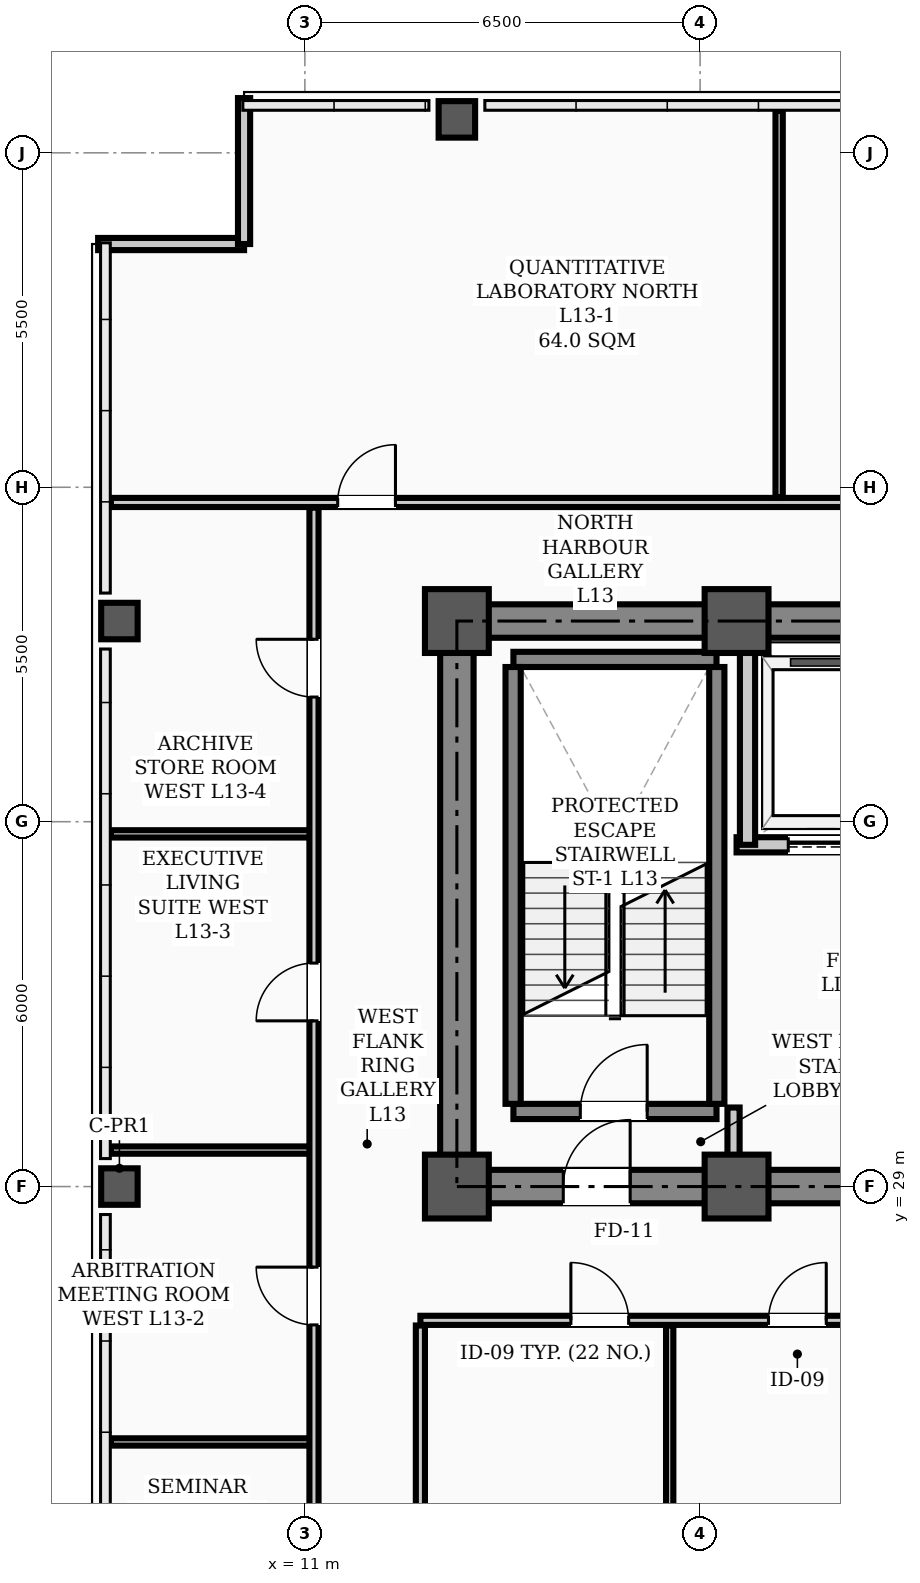
"""IFC4 building model, lengths in metres.
Left out: names, types, materials, properties, quantities, classifications, styles, units other than length and angle.
Written with IfcOpenShell. Run it as: python <this file> out.ifc"""

import sys

from ifc_helpers import new_model, si_unit, direction, frame, frame_2d, origin, origin_2d, place, context, subcontext, project, spatial, rectangle, hollow_rectangle, extrude, element, fill, save


model = new_model("IFC4")
c1 = context("Model", 3, precision=1e-05, world=origin(), true_north=direction((0.0, 1.0)))
c2 = subcontext(c1, "Body", "Model", "MODEL_VIEW")
j1 = project(units=[si_unit("LENGTHUNIT", "METRE"), si_unit("PLANEANGLEUNIT", "RADIAN")], contexts=[c1])
p1 = place(None, origin())
s1 = spatial("IfcSite", under=j1, at=p1, CompositionType="ELEMENT")
p2 = place(p1, origin())
s2 = spatial("IfcBuilding", under=s1, at=p2, CompositionType="ELEMENT")
p3 = place(p2, frame((0.0, 0.0, 53.8)))
s3 = spatial("IfcBuildingStorey", under=s2, at=p3, CompositionType="ELEMENT", Elevation=53.8)
for number, where, z_axis, x_axis in (
    (1, (13.5, 29.0, 0.0), (0.0, 0.0, 1.0), (1.0, 0.0, 0.0)),
    (2, (13.5, 38.3, 0.0), (0.0, 0.0, 1.0), (1.0, 0.0, 0.0)),
    (3, (18.1, 29.0, 0.0), (0.0, 0.0, 1.0), (1.0, 0.0, 0.0)),
    (4, (18.1, 38.3, 0.0), (0.0, 0.0, 1.0), (1.0, 0.0, 0.0)),
):
    element("IfcColumn", number, at=place(p3, frame(where, z_axis=z_axis, x_axis=x_axis)), inside=s3, PredefinedType="COLUMN", context=c2, shape_type="SweptSolid", body=[
        extrude(hollow_rectangle(XDim=1.05, YDim=1.05, WallThickness=0.038, InnerFilletRadius=0.019, OuterFilletRadius=0.057, at=origin_2d()), origin(), (0.0, 0.0, 1.0), 3.9),
    ])
for number, where, z_axis, x_axis in (
    (5, (7.95, 29.0, 0.0), (0.0, 0.0, 1.0), (1.0, 0.0, 0.0)),
    (6, (7.95, 38.3, 0.0), (0.0, 0.0, 1.0), (1.0, 0.0, 0.0)),
    (7, (13.5, 46.55, 0.0), (0.0, 0.0, 1.0), (1.0, 0.0, 0.0)),
):
    element("IfcColumn", number, at=place(p3, frame(where, z_axis=z_axis, x_axis=x_axis)), inside=s3, PredefinedType="COLUMN", context=c2, shape_type="SweptSolid", body=[
        extrude(hollow_rectangle(XDim=0.6, YDim=0.6, WallThickness=0.026, InnerFilletRadius=0.013, OuterFilletRadius=0.039, at=origin_2d()), origin(), (0.0, 0.0, 1.0), 3.9),
    ])
for number, where, z_axis, x_axis in (
    (8, (7.6, 44.5, 0.0), (0.0, 0.0, 1.0), (1.0, 0.0, 0.0)),
    (9, (10.0, 44.5, 0.0), (0.0, 0.0, 1.0), (0.0, 1.0, 0.0)),
):
    element("IfcWall", number, at=place(p3, frame(where, z_axis=z_axis, x_axis=x_axis)), inside=s3, PredefinedType="PARAPET", context=c2, shape_type="SweptSolid", body=[
        extrude(rectangle(XDim=2.4, YDim=0.2, at=frame_2d((1.2, 0.0))), origin(), (0.0, 0.0, 1.0), 1.2),
    ])
p4 = place(p3, frame((13.5, 29.0, 0.0), z_axis=(0.0, 0.0, 1.0), x_axis=(1.0, 0.0, 0.0)))
e10 = element("IfcWall", 10, at=p4, inside=s3, PredefinedType="SHEAR", context=c2, shape_type="SweptSolid", body=[
    extrude(rectangle(XDim=30.5, YDim=0.55, at=frame_2d((15.25, 0.0))), origin(), (0.0, 0.0, 1.0), 3.72),
])
p5 = place(p4, frame((1.75, 0.0, 0.0)))
e11 = element("IfcOpeningElement", 11, at=p5, cuts=e10, PredefinedType="OPENING", context=c2, shape_type="SweptSolid", body=[
    extrude(rectangle(XDim=1.1, YDim=2.08, at=frame_2d((0.55, 1.04))), frame((0.0, 0.285, 0.0), z_axis=(0.0, -1.0, 0.0), x_axis=(1.0, 0.0, 0.0)), (0.0, 0.0, 1.0), 0.57),
])
p6 = place(p4, frame((26.7, 0.0, 0.0)))
e12 = element("IfcOpeningElement", 12, at=p6, cuts=e10, PredefinedType="OPENING", context=c2, shape_type="SweptSolid", body=[
    extrude(rectangle(XDim=1.1, YDim=2.08, at=frame_2d((0.55, 1.04))), frame((0.0, 0.285, 0.0), z_axis=(0.0, -1.0, 0.0), x_axis=(1.0, 0.0, 0.0)), (0.0, 0.0, 1.0), 0.57),
])
p7 = place(p4, frame((6.8, 0.0, 0.0)))
e13 = element("IfcOpeningElement", 13, at=p7, cuts=e10, PredefinedType="OPENING", context=c2, shape_type="SweptSolid", body=[
    extrude(rectangle(XDim=1.1, YDim=2.08, at=frame_2d((0.55, 1.04))), frame((0.0, 0.285, 0.0), z_axis=(0.0, -1.0, 0.0), x_axis=(1.0, 0.0, 0.0)), (0.0, 0.0, 1.0), 0.57),
])
p8 = place(p4, frame((13.2, 0.0, 0.0)))
e14 = element("IfcOpeningElement", 14, at=p8, cuts=e10, PredefinedType="OPENING", context=c2, shape_type="SweptSolid", body=[
    extrude(rectangle(XDim=1.6, YDim=2.08, at=frame_2d((0.8, 1.04))), frame((0.0, 0.285, 0.0), z_axis=(0.0, -1.0, 0.0), x_axis=(1.0, 0.0, 0.0)), (0.0, 0.0, 1.0), 0.57),
])
p9 = place(p4, frame((19.5, 0.0, 0.0)))
e15 = element("IfcOpeningElement", 15, at=p9, cuts=e10, PredefinedType="OPENING", context=c2, shape_type="SweptSolid", body=[
    extrude(rectangle(XDim=0.9, YDim=2.08, at=frame_2d((0.45, 1.04))), frame((0.0, 0.285, 0.0), z_axis=(0.0, -1.0, 0.0), x_axis=(1.0, 0.0, 0.0)), (0.0, 0.0, 1.0), 0.57),
])
p10 = place(p4, frame((21.55, 0.0, 0.0)))
e16 = element("IfcOpeningElement", 16, at=p10, cuts=e10, PredefinedType="OPENING", context=c2, shape_type="SweptSolid", body=[
    extrude(rectangle(XDim=0.9, YDim=2.08, at=frame_2d((0.45, 1.04))), frame((0.0, 0.285, 0.0), z_axis=(0.0, -1.0, 0.0), x_axis=(1.0, 0.0, 0.0)), (0.0, 0.0, 1.0), 0.57),
])
p11 = place(p3, frame((13.5, 38.3, 0.0), z_axis=(0.0, 0.0, 1.0), x_axis=(1.0, 0.0, 0.0)))
e17 = element("IfcWall", 17, at=p11, inside=s3, PredefinedType="SHEAR", context=c2, shape_type="SweptSolid", body=[
    extrude(rectangle(XDim=30.5, YDim=0.55, at=frame_2d((15.25, 0.0))), origin(), (0.0, 0.0, 1.0), 3.72),
])
p12 = place(p3, frame((13.5, 29.35, 0.0), z_axis=(0.0, 0.0, 1.0), x_axis=(0.0, 1.0, 0.0)))
e18 = element("IfcWall", 18, at=p12, inside=s3, PredefinedType="SHEAR", context=c2, shape_type="SweptSolid", body=[
    extrude(rectangle(XDim=8.6, YDim=0.55, at=frame_2d((4.3, 0.0))), origin(), (0.0, 0.0, 1.0), 3.72),
])
p13 = place(p3, frame((14.43, 30.235, 0.0), z_axis=(0.0, 0.0, 1.0), x_axis=(1.0, 0.0, 0.0)))
e19 = element("IfcWall", 19, at=p13, inside=s3, PredefinedType="STANDARD", context=c2, shape_type="SweptSolid", body=[
    extrude(rectangle(XDim=3.34, YDim=0.25, at=frame_2d((1.67, 0.0))), origin(), (0.0, 0.0, 1.0), 3.72),
])
p14 = place(p13, frame((1.1, 0.0, 0.0)))
e20 = element("IfcOpeningElement", 20, at=p14, cuts=e19, PredefinedType="OPENING", context=c2, shape_type="SweptSolid", body=[
    extrude(rectangle(XDim=1.1, YDim=2.08, at=frame_2d((0.55, 1.04))), frame((0.0, 0.135, 0.0), z_axis=(0.0, -1.0, 0.0), x_axis=(1.0, 0.0, 0.0)), (0.0, 0.0, 1.0), 0.27),
])
p15 = place(p3, frame((14.43, 37.669, 0.0), z_axis=(0.0, 0.0, 1.0), x_axis=(1.0, 0.0, 0.0)))
e21 = element("IfcWall", 21, at=p15, inside=s3, PredefinedType="STANDARD", context=c2, shape_type="SweptSolid", body=[
    extrude(rectangle(XDim=3.34, YDim=0.25, at=frame_2d((1.67, 0.0))), origin(), (0.0, 0.0, 1.0), 3.72),
])
for number, where, z_axis, x_axis in (
    (22, (14.425, 30.36, 0.0), (0.0, 0.0, 1.0), (0.0, 1.0, 0.0)),
    (23, (17.775, 30.36, 0.0), (0.0, 0.0, 1.0), (0.0, 1.0, 0.0)),
):
    element("IfcWall", number, at=place(p3, frame(where, z_axis=z_axis, x_axis=x_axis)), inside=s3, PredefinedType="STANDARD", context=c2, shape_type="SweptSolid", body=[
        extrude(rectangle(XDim=7.184, YDim=0.25, at=frame_2d((3.592, 0.0))), origin(), (0.0, 0.0, 1.0), 3.72),
    ])
p16 = place(p3, frame((18.1, 34.62, 0.0), z_axis=(0.0, 0.0, 1.0), x_axis=(1.0, 0.0, 0.0)))
e24 = element("IfcWall", 24, at=p16, inside=s3, PredefinedType="STANDARD", context=c2, shape_type="SweptSolid", body=[
    extrude(rectangle(XDim=5.35, YDim=0.25, at=frame_2d((2.675, 0.0))), origin(), (0.0, 0.0, 1.0), 3.72),
])
p17 = place(p16, frame((0.85, 0.0, 0.0)))
e25 = element("IfcOpeningElement", 25, at=p17, cuts=e24, PredefinedType="OPENING", context=c2, shape_type="SweptSolid", body=[
    extrude(rectangle(XDim=1.1, YDim=2.08, at=frame_2d((0.55, 1.04))), frame((0.0, 0.135, 0.0), z_axis=(0.0, -1.0, 0.0), x_axis=(1.0, 0.0, 0.0)), (0.0, 0.0, 1.0), 0.27),
])
p18 = place(p16, frame((3.45, 0.0, 0.0)))
e26 = element("IfcOpeningElement", 26, at=p18, cuts=e24, PredefinedType="OPENING", context=c2, shape_type="SweptSolid", body=[
    extrude(rectangle(XDim=1.1, YDim=2.08, at=frame_2d((0.55, 1.04))), frame((0.0, 0.135, 0.0), z_axis=(0.0, -1.0, 0.0), x_axis=(1.0, 0.0, 0.0)), (0.0, 0.0, 1.0), 0.27),
])
p19 = place(p3, frame((18.28, 34.62, 0.0), z_axis=(0.0, 0.0, 1.0), x_axis=(0.0, 1.0, 0.0)))
e27 = element("IfcWall", 27, at=p19, inside=s3, PredefinedType="STANDARD", context=c2, shape_type="SweptSolid", body=[
    extrude(rectangle(XDim=3.33, YDim=0.25, at=frame_2d((1.665, 0.0))), origin(), (0.0, 0.0, 1.0), 3.3),
])
p20 = place(p3, frame((12.9, 26.8, 0.0), z_axis=(0.0, 0.0, 1.0), x_axis=(1.0, 0.0, 0.0)))
e28 = element("IfcWall", 28, at=p20, inside=s3, PredefinedType="PARTITIONING", context=c2, shape_type="SweptSolid", body=[
    extrude(rectangle(XDim=31.7, YDim=0.15, at=frame_2d((15.85, 0.0))), origin(), (0.0, 0.0, 1.0), 3.1),
])
p21 = place(p20, frame((13.6, 0.0, 0.0)))
e29 = element("IfcOpeningElement", 29, at=p21, cuts=e28, PredefinedType="OPENING", context=c2, shape_type="SweptSolid", body=[
    extrude(rectangle(XDim=1.6, YDim=2.08, at=frame_2d((0.8, 1.04))), frame((0.0, 0.085, 0.0), z_axis=(0.0, -1.0, 0.0), x_axis=(1.0, 0.0, 0.0)), (0.0, 0.0, 1.0), 0.17),
])
p22 = place(p20, frame((2.475, 0.0, 0.0)))
e30 = element("IfcOpeningElement", 30, at=p22, cuts=e28, PredefinedType="OPENING", context=c2, shape_type="SweptSolid", body=[
    extrude(rectangle(XDim=0.95, YDim=2.08, at=frame_2d((0.475, 1.04))), frame((0.0, 0.085, 0.0), z_axis=(0.0, -1.0, 0.0), x_axis=(1.0, 0.0, 0.0)), (0.0, 0.0, 1.0), 0.17),
])
p23 = place(p20, frame((5.725, 0.0, 0.0)))
e31 = element("IfcOpeningElement", 31, at=p23, cuts=e28, PredefinedType="OPENING", context=c2, shape_type="SweptSolid", body=[
    extrude(rectangle(XDim=0.95, YDim=2.08, at=frame_2d((0.475, 1.04))), frame((0.0, 0.085, 0.0), z_axis=(0.0, -1.0, 0.0), x_axis=(1.0, 0.0, 0.0)), (0.0, 0.0, 1.0), 0.17),
])
p24 = place(p20, frame((8.875, 0.0, 0.0)))
e32 = element("IfcOpeningElement", 32, at=p24, cuts=e28, PredefinedType="OPENING", context=c2, shape_type="SweptSolid", body=[
    extrude(rectangle(XDim=0.95, YDim=2.08, at=frame_2d((0.475, 1.04))), frame((0.0, 0.085, 0.0), z_axis=(0.0, -1.0, 0.0), x_axis=(1.0, 0.0, 0.0)), (0.0, 0.0, 1.0), 0.17),
])
p25 = place(p20, frame((16.075, 0.0, 0.0)))
e33 = element("IfcOpeningElement", 33, at=p25, cuts=e28, PredefinedType="OPENING", context=c2, shape_type="SweptSolid", body=[
    extrude(rectangle(XDim=0.95, YDim=2.08, at=frame_2d((0.475, 1.04))), frame((0.0, 0.085, 0.0), z_axis=(0.0, -1.0, 0.0), x_axis=(1.0, 0.0, 0.0)), (0.0, 0.0, 1.0), 0.17),
])
p26 = place(p20, frame((22.525, 0.0, 0.0)))
e34 = element("IfcOpeningElement", 34, at=p26, cuts=e28, PredefinedType="OPENING", context=c2, shape_type="SweptSolid", body=[
    extrude(rectangle(XDim=0.95, YDim=2.08, at=frame_2d((0.475, 1.04))), frame((0.0, 0.085, 0.0), z_axis=(0.0, -1.0, 0.0), x_axis=(1.0, 0.0, 0.0)), (0.0, 0.0, 1.0), 0.17),
])
p27 = place(p20, frame((28.825, 0.0, 0.0)))
e35 = element("IfcOpeningElement", 35, at=p27, cuts=e28, PredefinedType="OPENING", context=c2, shape_type="SweptSolid", body=[
    extrude(rectangle(XDim=0.95, YDim=2.08, at=frame_2d((0.475, 1.04))), frame((0.0, 0.085, 0.0), z_axis=(0.0, -1.0, 0.0), x_axis=(1.0, 0.0, 0.0)), (0.0, 0.0, 1.0), 0.17),
])
p28 = place(p3, frame((7.81, 24.8, 0.0), z_axis=(0.0, 0.0, 1.0), x_axis=(1.0, 0.0, 0.0)))
e36 = element("IfcWall", 36, at=p28, inside=s3, PredefinedType="PARTITIONING", context=c2, shape_type="SweptSolid", body=[
    extrude(rectangle(XDim=3.34, YDim=0.12, at=frame_2d((1.67, 0.0))), origin(), (0.0, 0.0, 1.0), 3.212),
])
p29 = place(p3, frame((7.81, 29.6, 0.0), z_axis=(0.0, 0.0, 1.0), x_axis=(1.0, 0.0, 0.0)))
e37 = element("IfcWall", 37, at=p29, inside=s3, PredefinedType="PARTITIONING", context=c2, shape_type="SweptSolid", body=[
    extrude(rectangle(XDim=3.34, YDim=0.12, at=frame_2d((1.67, 0.0))), origin(), (0.0, 0.0, 1.0), 3.0),
])
p30 = place(p3, frame((7.81, 34.8, 0.0), z_axis=(0.0, 0.0, 1.0), x_axis=(1.0, 0.0, 0.0)))
e38 = element("IfcWall", 38, at=p30, inside=s3, PredefinedType="PARTITIONING", context=c2, shape_type="SweptSolid", body=[
    extrude(rectangle(XDim=3.34, YDim=0.12, at=frame_2d((1.67, 0.0))), origin(), (0.0, 0.0, 1.0), 3.212),
])
p31 = place(p3, frame((7.81, 40.25, 0.0), z_axis=(0.0, 0.0, 1.0), x_axis=(1.0, 0.0, 0.0)))
e39 = element("IfcWall", 39, at=p31, inside=s3, PredefinedType="PARTITIONING", context=c2, shape_type="SweptSolid", body=[
    extrude(rectangle(XDim=49.38, YDim=0.15, at=frame_2d((24.69, 0.0))), origin(), (0.0, 0.0, 1.0), 3.1),
])
p32 = place(p31, frame((3.73, 0.0, 0.0)))
e40 = element("IfcOpeningElement", 40, at=p32, cuts=e39, PredefinedType="OPENING", context=c2, shape_type="SweptSolid", body=[
    extrude(rectangle(XDim=0.95, YDim=2.08, at=frame_2d((0.475, 1.04))), frame((0.0, 0.085, 0.0), z_axis=(0.0, -1.0, 0.0), x_axis=(1.0, 0.0, 0.0)), (0.0, 0.0, 1.0), 0.17),
])
p33 = place(p31, frame((13.815, 0.0, 0.0)))
e41 = element("IfcOpeningElement", 41, at=p33, cuts=e39, PredefinedType="OPENING", context=c2, shape_type="SweptSolid", body=[
    extrude(rectangle(XDim=0.95, YDim=2.08, at=frame_2d((0.475, 1.04))), frame((0.0, 0.085, 0.0), z_axis=(0.0, -1.0, 0.0), x_axis=(1.0, 0.0, 0.0)), (0.0, 0.0, 1.0), 0.17),
])
p34 = place(p31, frame((19.965, 0.0, 0.0)))
e42 = element("IfcOpeningElement", 42, at=p34, cuts=e39, PredefinedType="OPENING", context=c2, shape_type="SweptSolid", body=[
    extrude(rectangle(XDim=0.95, YDim=2.08, at=frame_2d((0.475, 1.04))), frame((0.0, 0.085, 0.0), z_axis=(0.0, -1.0, 0.0), x_axis=(1.0, 0.0, 0.0)), (0.0, 0.0, 1.0), 0.17),
])
p35 = place(p31, frame((30.815, 0.0, 0.0)))
e43 = element("IfcOpeningElement", 43, at=p35, cuts=e39, PredefinedType="OPENING", context=c2, shape_type="SweptSolid", body=[
    extrude(rectangle(XDim=0.95, YDim=2.08, at=frame_2d((0.475, 1.04))), frame((0.0, 0.085, 0.0), z_axis=(0.0, -1.0, 0.0), x_axis=(1.0, 0.0, 0.0)), (0.0, 0.0, 1.0), 0.17),
])
p36 = place(p31, frame((37.2, 0.0, 0.0)))
e44 = element("IfcOpeningElement", 44, at=p36, cuts=e39, PredefinedType="OPENING", context=c2, shape_type="SweptSolid", body=[
    extrude(rectangle(XDim=0.95, YDim=2.08, at=frame_2d((0.475, 1.04))), frame((0.0, 0.085, 0.0), z_axis=(0.0, -1.0, 0.0), x_axis=(1.0, 0.0, 0.0)), (0.0, 0.0, 1.0), 0.17),
])
p37 = place(p3, frame((18.05, 29.285, 0.0), z_axis=(0.0, 0.0, 1.0), x_axis=(0.0, 1.0, 0.0)))
e45 = element("IfcWall", 45, at=p37, inside=s3, PredefinedType="STANDARD", context=c2, shape_type="SweptSolid", body=[
    extrude(rectangle(XDim=1.015, YDim=0.2, at=frame_2d((0.508, 0.0))), origin(), (0.0, 0.0, 1.0), 3.3),
])
p38 = place(p3, frame((11.15, 17.635, 0.0), z_axis=(0.0, 0.0, 1.0), x_axis=(0.0, 1.0, 0.0)))
e46 = element("IfcWall", 46, at=p38, inside=s3, PredefinedType="PARTITIONING", context=c2, shape_type="SweptSolid", body=[
    extrude(rectangle(XDim=22.53, YDim=0.15, at=frame_2d((11.265, 0.0))), origin(), (0.0, 0.0, 1.0), 3.0),
])
p39 = place(p38, frame((3.065, 0.0, 0.0)))
e47 = element("IfcOpeningElement", 47, at=p39, cuts=e46, PredefinedType="OPENING", context=c2, shape_type="SweptSolid", body=[
    extrude(rectangle(XDim=0.95, YDim=2.08, at=frame_2d((0.475, 1.04))), frame((0.0, 0.085, 0.0), z_axis=(0.0, -1.0, 0.0), x_axis=(1.0, 0.0, 0.0)), (0.0, 0.0, 1.0), 0.17),
])
p40 = place(p38, frame((9.09, 0.0, 0.0)))
e48 = element("IfcOpeningElement", 48, at=p40, cuts=e46, PredefinedType="OPENING", context=c2, shape_type="SweptSolid", body=[
    extrude(rectangle(XDim=0.95, YDim=2.08, at=frame_2d((0.475, 1.04))), frame((0.0, 0.085, 0.0), z_axis=(0.0, -1.0, 0.0), x_axis=(1.0, 0.0, 0.0)), (0.0, 0.0, 1.0), 0.17),
])
p41 = place(p38, frame((14.09, 0.0, 0.0)))
e49 = element("IfcOpeningElement", 49, at=p41, cuts=e46, PredefinedType="OPENING", context=c2, shape_type="SweptSolid", body=[
    extrude(rectangle(XDim=0.95, YDim=2.08, at=frame_2d((0.475, 1.04))), frame((0.0, 0.085, 0.0), z_axis=(0.0, -1.0, 0.0), x_axis=(1.0, 0.0, 0.0)), (0.0, 0.0, 1.0), 0.17),
])
p42 = place(p38, frame((19.415, 0.0, 0.0)))
e50 = element("IfcOpeningElement", 50, at=p42, cuts=e46, PredefinedType="OPENING", context=c2, shape_type="SweptSolid", body=[
    extrude(rectangle(XDim=0.95, YDim=2.08, at=frame_2d((0.475, 1.04))), frame((0.0, 0.085, 0.0), z_axis=(0.0, -1.0, 0.0), x_axis=(1.0, 0.0, 0.0)), (0.0, 0.0, 1.0), 0.17),
])
p43 = place(p3, frame((12.9, 19.335, 0.0), z_axis=(0.0, 0.0, 1.0), x_axis=(0.0, 1.0, 0.0)))
e51 = element("IfcWall", 51, at=p43, inside=s3, PredefinedType="PARTITIONING", context=c2, shape_type="SweptSolid", body=[
    extrude(rectangle(XDim=7.38, YDim=0.15, at=frame_2d((3.69, 0.0))), origin(), (0.0, 0.0, 1.0), 3.0),
])
p44 = place(p3, frame((17.0, 19.335, 0.0), z_axis=(0.0, 0.0, 1.0), x_axis=(0.0, 1.0, 0.0)))
e52 = element("IfcWall", 52, at=p44, inside=s3, PredefinedType="PARTITIONING", context=c2, shape_type="SweptSolid", body=[
    extrude(rectangle(XDim=7.38, YDim=0.12, at=frame_2d((3.69, 0.0))), origin(), (0.0, 0.0, 1.0), 3.0),
])
p45 = place(p3, frame((18.8, 40.335, 0.0), z_axis=(0.0, 0.0, 1.0), x_axis=(0.0, 1.0, 0.0)))
e53 = element("IfcWall", 53, at=p45, inside=s3, PredefinedType="PARTITIONING", context=c2, shape_type="SweptSolid", body=[
    extrude(rectangle(XDim=6.355, YDim=0.12, at=frame_2d((3.177, 0.0))), origin(), (0.0, 0.0, 1.0), 3.212),
])
p46 = place(p14, origin())
e54 = element("IfcDoor", 54, at=p46, inside=s3, OperationType="SINGLE_SWING_RIGHT", PredefinedType="DOOR", context=c2, shape_type="SweptSolid", body=[
    extrude(rectangle(XDim=1.1, YDim=2.08, at=frame_2d((0.55, 1.04))), frame((0.0, 0.025, 0.0), z_axis=(0.0, -1.0, 0.0), x_axis=(1.0, 0.0, 0.0)), (0.0, 0.0, 1.0), 0.05),
])
fill(e20, e54)
p47 = place(p5, origin())
e55 = element("IfcDoor", 55, at=p47, inside=s3, OperationType="SINGLE_SWING_RIGHT", PredefinedType="DOOR", context=c2, shape_type="SweptSolid", body=[
    extrude(rectangle(XDim=1.1, YDim=2.08, at=frame_2d((0.55, 1.04))), frame((0.0, 0.025, 0.0), z_axis=(0.0, -1.0, 0.0), x_axis=(1.0, 0.0, 0.0)), (0.0, 0.0, 1.0), 0.05),
])
fill(e11, e55)
p48 = place(p22, origin())
e56 = element("IfcDoor", 56, at=p48, inside=s3, OperationType="SINGLE_SWING_LEFT", PredefinedType="DOOR", context=c2, shape_type="SweptSolid", body=[
    extrude(rectangle(XDim=0.95, YDim=2.08, at=frame_2d((0.475, 1.04))), frame((0.0, 0.025, 0.0), z_axis=(0.0, -1.0, 0.0), x_axis=(1.0, 0.0, 0.0)), (0.0, 0.0, 1.0), 0.05),
])
fill(e30, e56)
p49 = place(p23, origin())
e57 = element("IfcDoor", 57, at=p49, inside=s3, OperationType="SINGLE_SWING_RIGHT", PredefinedType="DOOR", context=c2, shape_type="SweptSolid", body=[
    extrude(rectangle(XDim=0.95, YDim=2.08, at=frame_2d((0.475, 1.04))), frame((0.0, 0.025, 0.0), z_axis=(0.0, -1.0, 0.0), x_axis=(1.0, 0.0, 0.0)), (0.0, 0.0, 1.0), 0.05),
])
fill(e31, e57)
p50 = place(p40, origin())
e58 = element("IfcDoor", 58, at=p50, inside=s3, OperationType="SINGLE_SWING_RIGHT", PredefinedType="DOOR", context=c2, shape_type="SweptSolid", body=[
    extrude(rectangle(XDim=0.95, YDim=2.08, at=frame_2d((0.475, 1.04))), frame((0.0, 0.025, 0.0), z_axis=(0.0, -1.0, 0.0), x_axis=(1.0, 0.0, 0.0)), (0.0, 0.0, 1.0), 0.05),
])
fill(e48, e58)
p51 = place(p41, origin())
e59 = element("IfcDoor", 59, at=p51, inside=s3, OperationType="SINGLE_SWING_LEFT", PredefinedType="DOOR", context=c2, shape_type="SweptSolid", body=[
    extrude(rectangle(XDim=0.95, YDim=2.08, at=frame_2d((0.475, 1.04))), frame((0.0, 0.025, 0.0), z_axis=(0.0, -1.0, 0.0), x_axis=(1.0, 0.0, 0.0)), (0.0, 0.0, 1.0), 0.05),
])
fill(e49, e59)
p52 = place(p42, origin())
e60 = element("IfcDoor", 60, at=p52, inside=s3, OperationType="SINGLE_SWING_RIGHT", PredefinedType="DOOR", context=c2, shape_type="SweptSolid", body=[
    extrude(rectangle(XDim=0.95, YDim=2.08, at=frame_2d((0.475, 1.04))), frame((0.0, 0.025, 0.0), z_axis=(0.0, -1.0, 0.0), x_axis=(1.0, 0.0, 0.0)), (0.0, 0.0, 1.0), 0.05),
])
fill(e50, e60)
p53 = place(p32, origin())
e61 = element("IfcDoor", 61, at=p53, inside=s3, OperationType="SINGLE_SWING_RIGHT", PredefinedType="DOOR", context=c2, shape_type="SweptSolid", body=[
    extrude(rectangle(XDim=0.95, YDim=2.08, at=frame_2d((0.475, 1.04))), frame((0.0, 0.025, 0.0), z_axis=(0.0, -1.0, 0.0), x_axis=(1.0, 0.0, 0.0)), (0.0, 0.0, 1.0), 0.05),
])
fill(e40, e61)
p54 = place(p17, origin())
e62 = element("IfcDoor", 62, at=p54, inside=s3, OperationType="SLIDING_TO_LEFT", PredefinedType="DOOR", context=c2, shape_type="SweptSolid", body=[
    extrude(rectangle(XDim=1.1, YDim=2.08, at=frame_2d((0.55, 1.04))), frame((0.0, 0.025, 0.0), z_axis=(0.0, -1.0, 0.0), x_axis=(1.0, 0.0, 0.0)), (0.0, 0.0, 1.0), 0.05),
])
fill(e25, e62)
save(model, sys.argv[1])
